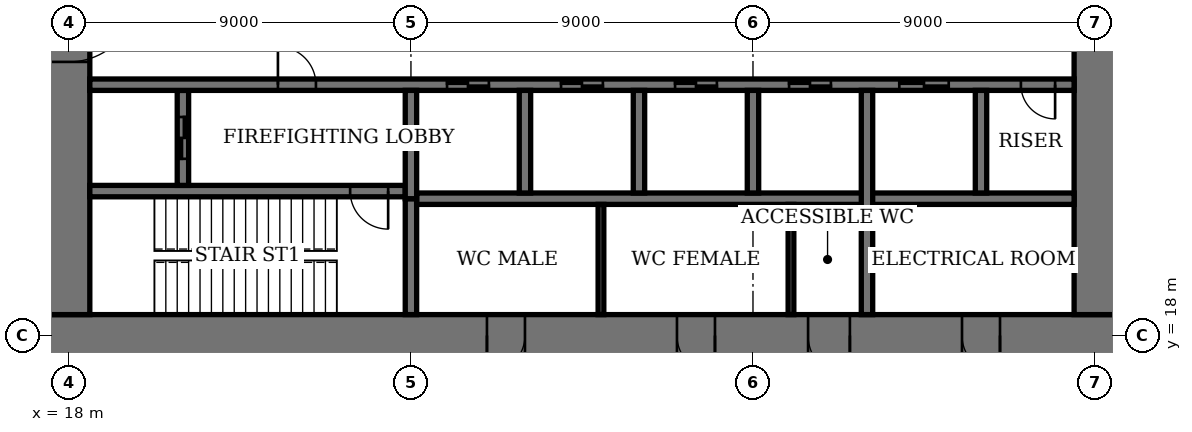
"""IFC4 building model, lengths in metres.
Left out: names, types, materials, properties, quantities, classifications, styles, units other than length and angle.
Written with IfcOpenShell. Run it as: python <this file> out.ifc"""

import sys

from ifc_helpers import new_model, si_unit, direction, frame, frame_2d, origin, place, context, subcontext, project, spatial, rectangle, extrude, element, fill, save


model = new_model("IFC4")
c1 = context("Model", 3, precision=1e-05, world=origin(), true_north=direction((0.0, 1.0)))
c2 = subcontext(c1, "Body", "Model", "MODEL_VIEW")
j1 = project(units=[si_unit("LENGTHUNIT", "METRE"), si_unit("PLANEANGLEUNIT", "RADIAN")], contexts=[c1])
p1 = place(None, origin())
s1 = spatial("IfcSite", under=j1, at=p1, CompositionType="ELEMENT")
p2 = place(p1, origin())
s2 = spatial("IfcBuilding", under=s1, at=p2, CompositionType="ELEMENT")
p3 = place(p2, frame((0.0, 0.0, 157.2)))
s3 = spatial("IfcBuildingStorey", under=s2, at=p3, CompositionType="ELEMENT", Elevation=157.2)
p4 = place(p3, frame((17.45, 18.0, 0.0), z_axis=(0.0, 0.0, 1.0), x_axis=(1.0, 0.0, 0.0)))
e1 = element("IfcWall", 1, at=p4, inside=s3, PredefinedType="SHEAR", context=c2, shape_type="SweptSolid", body=[
    extrude(rectangle(XDim=28.1, YDim=1.1, at=frame_2d((14.05, 0.0))), origin(), (0.0, 0.0, 1.0), 5.0),
])
p5 = place(p4, frame((11.55, 0.0, 0.0)))
e2 = element("IfcOpeningElement", 2, at=p5, cuts=e1, PredefinedType="OPENING", context=c2, shape_type="SweptSolid", body=[
    extrude(rectangle(XDim=1.0, YDim=2.4, at=frame_2d((0.5, 1.2))), frame((0.0, 0.56, 0.0), z_axis=(0.0, -1.0, 0.0), x_axis=(1.0, 0.0, 0.0)), (0.0, 0.0, 1.0), 1.12),
])
p6 = place(p4, frame((16.55, 0.0, 0.0)))
e3 = element("IfcOpeningElement", 3, at=p6, cuts=e1, PredefinedType="OPENING", context=c2, shape_type="SweptSolid", body=[
    extrude(rectangle(XDim=1.0, YDim=2.4, at=frame_2d((0.5, 1.2))), frame((0.0, 0.56, 0.0), z_axis=(0.0, -1.0, 0.0), x_axis=(1.0, 0.0, 0.0)), (0.0, 0.0, 1.0), 1.12),
])
p7 = place(p4, frame((20.0, 0.0, 0.0)))
e4 = element("IfcOpeningElement", 4, at=p7, cuts=e1, PredefinedType="OPENING", context=c2, shape_type="SweptSolid", body=[
    extrude(rectangle(XDim=1.1, YDim=2.4, at=frame_2d((0.55, 1.2))), frame((0.0, 0.56, 0.0), z_axis=(0.0, -1.0, 0.0), x_axis=(1.0, 0.0, 0.0)), (0.0, 0.0, 1.0), 1.12),
])
p8 = place(p4, frame((24.05, 0.0, 0.0)))
e5 = element("IfcOpeningElement", 5, at=p8, cuts=e1, PredefinedType="OPENING", context=c2, shape_type="SweptSolid", body=[
    extrude(rectangle(XDim=1.0, YDim=2.4, at=frame_2d((0.5, 1.2))), frame((0.0, 0.56, 0.0), z_axis=(0.0, -1.0, 0.0), x_axis=(1.0, 0.0, 0.0)), (0.0, 0.0, 1.0), 1.12),
])
p9 = place(p3, frame((18.0, 35.45, 0.0), z_axis=(0.0, 0.0, 1.0), x_axis=(0.0, -1.0, 0.0)))
e6 = element("IfcWall", 6, at=p9, inside=s3, PredefinedType="SHEAR", context=c2, shape_type="SweptSolid", body=[
    extrude(rectangle(XDim=16.9, YDim=1.1, at=frame_2d((8.45, 0.0))), origin(), (0.0, 0.0, 1.0), 5.0),
])
p10 = place(p9, frame((8.45, 0.0, 0.0)))
e7 = element("IfcOpeningElement", 7, at=p10, cuts=e6, PredefinedType="OPENING", context=c2, shape_type="SweptSolid", body=[
    extrude(rectangle(XDim=1.8, YDim=2.4, at=frame_2d((0.9, 1.2))), frame((0.0, 0.56, 0.0), z_axis=(0.0, -1.0, 0.0), x_axis=(1.0, 0.0, 0.0)), (0.0, 0.0, 1.0), 1.12),
])
p11 = place(p3, frame((45.0, 18.55, 0.0), z_axis=(0.0, 0.0, 1.0), x_axis=(0.0, 1.0, 0.0)))
e8 = element("IfcWall", 8, at=p11, inside=s3, PredefinedType="SHEAR", context=c2, shape_type="SweptSolid", body=[
    extrude(rectangle(XDim=16.9, YDim=1.1, at=frame_2d((8.45, 0.0))), origin(), (0.0, 0.0, 1.0), 5.0),
])
p12 = place(p11, frame((8.45, 0.0, 0.0)))
e9 = element("IfcOpeningElement", 9, at=p12, cuts=e8, PredefinedType="OPENING", context=c2, shape_type="SweptSolid", body=[
    extrude(rectangle(XDim=1.8, YDim=2.4, at=frame_2d((0.9, 1.2))), frame((0.0, 0.56, 0.0), z_axis=(0.0, -1.0, 0.0), x_axis=(1.0, 0.0, 0.0)), (0.0, 0.0, 1.0), 1.12),
])
p13 = place(p3, frame((18.55, 21.8, 0.0), z_axis=(0.0, 0.0, 1.0), x_axis=(1.0, 0.0, 0.0)))
e10 = element("IfcWall", 10, at=p13, inside=s3, PredefinedType="SHEAR", context=c2, shape_type="SweptSolid", body=[
    extrude(rectangle(XDim=8.3, YDim=0.3, at=frame_2d((4.15, 0.0))), origin(), (0.0, 0.0, 1.0), 5.0),
])
p14 = place(p13, frame((6.85, 0.0, 0.0)))
e11 = element("IfcOpeningElement", 11, at=p14, cuts=e10, PredefinedType="OPENING", context=c2, shape_type="SweptSolid", body=[
    extrude(rectangle(XDim=1.0, YDim=2.4, at=frame_2d((0.5, 1.2))), frame((0.0, 0.16, 0.0), z_axis=(0.0, -1.0, 0.0), x_axis=(1.0, 0.0, 0.0)), (0.0, 0.0, 1.0), 0.32),
])
p15 = place(p3, frame((27.0, 18.55, 0.0), z_axis=(0.0, 0.0, 1.0), x_axis=(0.0, 1.0, 0.0)))
e12 = element("IfcWall", 12, at=p15, inside=s3, PredefinedType="SHEAR", context=c2, shape_type="SweptSolid", body=[
    extrude(rectangle(XDim=3.05, YDim=0.3, at=frame_2d((1.525, 0.0))), origin(), (0.0, 0.0, 1.0), 5.0),
])
p16 = place(p3, frame((21.0, 21.95, 0.0), z_axis=(0.0, 0.0, 1.0), x_axis=(0.0, 1.0, 0.0)))
e13 = element("IfcWall", 13, at=p16, inside=s3, PredefinedType="SHEAR", context=c2, shape_type="SweptSolid", body=[
    extrude(rectangle(XDim=2.5, YDim=0.3, at=frame_2d((1.25, 0.0))), origin(), (0.0, 0.0, 1.0), 5.0),
])
p17 = place(p16, frame((0.7, 0.0, 0.0)))
e14 = element("IfcOpeningElement", 14, at=p17, cuts=e13, PredefinedType="OPENING", context=c2, shape_type="SweptSolid", body=[
    extrude(rectangle(XDim=1.1, YDim=2.4, at=frame_2d((0.55, 1.2))), frame((0.0, 0.16, 0.0), z_axis=(0.0, -1.0, 0.0), x_axis=(1.0, 0.0, 0.0)), (0.0, 0.0, 1.0), 0.32),
])
p18 = place(p3, frame((18.55, 24.6, 0.0), z_axis=(0.0, 0.0, 1.0), x_axis=(1.0, 0.0, 0.0)))
e15 = element("IfcWall", 15, at=p18, inside=s3, PredefinedType="SHEAR", context=c2, shape_type="SweptSolid", body=[
    extrude(rectangle(XDim=25.9, YDim=0.3, at=frame_2d((12.95, 0.0))), origin(), (0.0, 0.0, 1.0), 5.0),
])
p19 = place(p18, frame((4.95, 0.0, 0.0)))
e16 = element("IfcOpeningElement", 16, at=p19, cuts=e15, PredefinedType="OPENING", context=c2, shape_type="SweptSolid", body=[
    extrude(rectangle(XDim=1.0, YDim=2.4, at=frame_2d((0.5, 1.2))), frame((0.0, 0.16, 0.0), z_axis=(0.0, -1.0, 0.0), x_axis=(1.0, 0.0, 0.0)), (0.0, 0.0, 1.0), 0.32),
])
p20 = place(p18, frame((24.5, 0.0, 0.0)))
e17 = element("IfcOpeningElement", 17, at=p20, cuts=e15, PredefinedType="OPENING", context=c2, shape_type="SweptSolid", body=[
    extrude(rectangle(XDim=0.9, YDim=2.1, at=frame_2d((0.45, 1.05))), frame((0.0, 0.16, 0.0), z_axis=(0.0, -1.0, 0.0), x_axis=(1.0, 0.0, 0.0)), (0.0, 0.0, 1.0), 0.32),
])
p21 = place(p18, frame((9.4, 0.0, 0.0)))
e18 = element("IfcOpeningElement", 18, at=p21, cuts=e15, PredefinedType="OPENING", context=c2, shape_type="SweptSolid", body=[
    extrude(rectangle(XDim=1.1, YDim=2.4, at=frame_2d((0.55, 1.2))), frame((0.0, 0.16, 0.0), z_axis=(0.0, -1.0, 0.0), x_axis=(1.0, 0.0, 0.0)), (0.0, 0.0, 1.0), 0.32),
])
p22 = place(p18, frame((12.4, 0.0, 0.0)))
e19 = element("IfcOpeningElement", 19, at=p22, cuts=e15, PredefinedType="OPENING", context=c2, shape_type="SweptSolid", body=[
    extrude(rectangle(XDim=1.1, YDim=2.4, at=frame_2d((0.55, 1.2))), frame((0.0, 0.16, 0.0), z_axis=(0.0, -1.0, 0.0), x_axis=(1.0, 0.0, 0.0)), (0.0, 0.0, 1.0), 0.32),
])
p23 = place(p18, frame((15.4, 0.0, 0.0)))
e20 = element("IfcOpeningElement", 20, at=p23, cuts=e15, PredefinedType="OPENING", context=c2, shape_type="SweptSolid", body=[
    extrude(rectangle(XDim=1.1, YDim=2.4, at=frame_2d((0.55, 1.2))), frame((0.0, 0.16, 0.0), z_axis=(0.0, -1.0, 0.0), x_axis=(1.0, 0.0, 0.0)), (0.0, 0.0, 1.0), 0.32),
])
p24 = place(p18, frame((18.4, 0.0, 0.0)))
e21 = element("IfcOpeningElement", 21, at=p24, cuts=e15, PredefinedType="OPENING", context=c2, shape_type="SweptSolid", body=[
    extrude(rectangle(XDim=1.1, YDim=2.4, at=frame_2d((0.55, 1.2))), frame((0.0, 0.16, 0.0), z_axis=(0.0, -1.0, 0.0), x_axis=(1.0, 0.0, 0.0)), (0.0, 0.0, 1.0), 0.32),
])
p25 = place(p18, frame((21.3, 0.0, 0.0)))
e22 = element("IfcOpeningElement", 22, at=p25, cuts=e15, PredefinedType="OPENING", context=c2, shape_type="SweptSolid", body=[
    extrude(rectangle(XDim=1.3, YDim=2.4, at=frame_2d((0.65, 1.2))), frame((0.0, 0.16, 0.0), z_axis=(0.0, -1.0, 0.0), x_axis=(1.0, 0.0, 0.0)), (0.0, 0.0, 1.0), 0.32),
])
p26 = place(p3, frame((27.15, 21.6, 0.0), z_axis=(0.0, 0.0, 1.0), x_axis=(1.0, 0.0, 0.0)))
e23 = element("IfcWall", 23, at=p26, inside=s3, PredefinedType="SHEAR", context=c2, shape_type="SweptSolid", body=[
    extrude(rectangle(XDim=17.3, YDim=0.3, at=frame_2d((8.65, 0.0))), origin(), (0.0, 0.0, 1.0), 5.0),
])
for number, where, z_axis, x_axis in (
    (24, (30.0, 21.75, 0.0), (0.0, 0.0, 1.0), (0.0, 1.0, 0.0)),
    (25, (33.0, 21.75, 0.0), (0.0, 0.0, 1.0), (0.0, 1.0, 0.0)),
    (26, (36.0, 21.75, 0.0), (0.0, 0.0, 1.0), (0.0, 1.0, 0.0)),
):
    element("IfcWall", number, at=place(p3, frame(where, z_axis=z_axis, x_axis=x_axis)), inside=s3, PredefinedType="SHEAR", context=c2, shape_type="SweptSolid", body=[
        extrude(rectangle(XDim=2.7, YDim=0.3, at=frame_2d((1.35, 0.0))), origin(), (0.0, 0.0, 1.0), 5.0),
    ])
p27 = place(p3, frame((39.0, 18.55, 0.0), z_axis=(0.0, 0.0, 1.0), x_axis=(0.0, 1.0, 0.0)))
e27 = element("IfcWall", 27, at=p27, inside=s3, PredefinedType="SHEAR", context=c2, shape_type="SweptSolid", body=[
    extrude(rectangle(XDim=5.9, YDim=0.3, at=frame_2d((2.95, 0.0))), origin(), (0.0, 0.0, 1.0), 5.0),
])
p28 = place(p3, frame((42.0, 21.75, 0.0), z_axis=(0.0, 0.0, 1.0), x_axis=(0.0, 1.0, 0.0)))
e28 = element("IfcWall", 28, at=p28, inside=s3, PredefinedType="SHEAR", context=c2, shape_type="SweptSolid", body=[
    extrude(rectangle(XDim=2.7, YDim=0.3, at=frame_2d((1.35, 0.0))), origin(), (0.0, 0.0, 1.0), 5.0),
])
p29 = place(p3, frame((27.0, 21.6, 0.0), z_axis=(0.0, 0.0, 1.0), x_axis=(0.0, 1.0, 0.0)))
e29 = element("IfcWall", 29, at=p29, inside=s3, PredefinedType="SHEAR", context=c2, shape_type="SweptSolid", body=[
    extrude(rectangle(XDim=2.85, YDim=0.3, at=frame_2d((1.425, 0.0))), origin(), (0.0, 0.0, 1.0), 5.0),
])
for number, where, z_axis, x_axis in (
    (30, (32.0, 18.55, 0.0), (0.0, 0.0, 1.0), (0.0, 1.0, 0.0)),
    (31, (37.0, 18.55, 0.0), (0.0, 0.0, 1.0), (0.0, 1.0, 0.0)),
):
    element("IfcWall", number, at=place(p3, frame(where, z_axis=z_axis, x_axis=x_axis)), inside=s3, PredefinedType="PARTITIONING", context=c2, shape_type="SweptSolid", body=[
        extrude(rectangle(XDim=2.9, YDim=0.15, at=frame_2d((1.45, 0.0))), origin(), (0.0, 0.0, 1.0), 4.6),
    ])
p30 = place(p10, origin())
e32 = element("IfcDoor", 32, at=p30, inside=s3, OperationType="DOUBLE_DOOR_DOUBLE_SWING", PredefinedType="DOOR", context=c2, shape_type="SweptSolid", body=[
    extrude(rectangle(XDim=1.8, YDim=2.4, at=frame_2d((0.9, 1.2))), frame((0.0, 0.03, 0.0), z_axis=(0.0, -1.0, 0.0), x_axis=(1.0, 0.0, 0.0)), (0.0, 0.0, 1.0), 0.06),
    extrude(rectangle(XDim=0.04, YDim=2.4, at=frame_2d((0.02, 1.2))), frame((0.0, 0.55, 0.0), z_axis=(0.0, -1.0, 0.0), x_axis=(1.0, 0.0, 0.0)), (0.0, 0.0, 1.0), 1.1),
    extrude(rectangle(XDim=0.04, YDim=2.4, at=frame_2d((1.78, 1.2))), frame((0.0, 0.55, 0.0), z_axis=(0.0, -1.0, 0.0), x_axis=(1.0, 0.0, 0.0)), (0.0, 0.0, 1.0), 1.1),
    extrude(rectangle(XDim=1.8, YDim=0.04, at=frame_2d((0.9, 2.38))), frame((0.0, 0.55, 0.0), z_axis=(0.0, -1.0, 0.0), x_axis=(1.0, 0.0, 0.0)), (0.0, 0.0, 1.0), 1.1),
])
fill(e7, e32)
p31 = place(p5, origin())
e33 = element("IfcDoor", 33, at=p31, inside=s3, OperationType="SINGLE_SWING_LEFT", PredefinedType="DOOR", context=c2, shape_type="SweptSolid", body=[
    extrude(rectangle(XDim=1.0, YDim=2.4, at=frame_2d((0.5, 1.2))), frame((0.0, 0.025, 0.0), z_axis=(0.0, -1.0, 0.0), x_axis=(1.0, 0.0, 0.0)), (0.0, 0.0, 1.0), 0.05),
    extrude(rectangle(XDim=0.04, YDim=2.4, at=frame_2d((0.02, 1.2))), frame((0.0, 0.4, 0.0), z_axis=(0.0, -1.0, 0.0), x_axis=(1.0, 0.0, 0.0)), (0.0, 0.0, 1.0), 0.8),
    extrude(rectangle(XDim=0.04, YDim=2.4, at=frame_2d((0.98, 1.2))), frame((0.0, 0.4, 0.0), z_axis=(0.0, -1.0, 0.0), x_axis=(1.0, 0.0, 0.0)), (0.0, 0.0, 1.0), 0.8),
    extrude(rectangle(XDim=1.0, YDim=0.04, at=frame_2d((0.5, 2.38))), frame((0.0, 0.4, 0.0), z_axis=(0.0, -1.0, 0.0), x_axis=(1.0, 0.0, 0.0)), (0.0, 0.0, 1.0), 0.8),
])
fill(e2, e33)
p32 = place(p6, origin())
e34 = element("IfcDoor", 34, at=p32, inside=s3, OperationType="SINGLE_SWING_RIGHT", PredefinedType="DOOR", context=c2, shape_type="SweptSolid", body=[
    extrude(rectangle(XDim=1.0, YDim=2.4, at=frame_2d((0.5, 1.2))), frame((0.0, 0.025, 0.0), z_axis=(0.0, -1.0, 0.0), x_axis=(1.0, 0.0, 0.0)), (0.0, 0.0, 1.0), 0.05),
    extrude(rectangle(XDim=0.04, YDim=2.4, at=frame_2d((0.02, 1.2))), frame((0.0, 0.4, 0.0), z_axis=(0.0, -1.0, 0.0), x_axis=(1.0, 0.0, 0.0)), (0.0, 0.0, 1.0), 0.8),
    extrude(rectangle(XDim=0.04, YDim=2.4, at=frame_2d((0.98, 1.2))), frame((0.0, 0.4, 0.0), z_axis=(0.0, -1.0, 0.0), x_axis=(1.0, 0.0, 0.0)), (0.0, 0.0, 1.0), 0.8),
    extrude(rectangle(XDim=1.0, YDim=0.04, at=frame_2d((0.5, 2.38))), frame((0.0, 0.4, 0.0), z_axis=(0.0, -1.0, 0.0), x_axis=(1.0, 0.0, 0.0)), (0.0, 0.0, 1.0), 0.8),
])
fill(e3, e34)
p33 = place(p7, origin())
e35 = element("IfcDoor", 35, at=p33, inside=s3, OperationType="SINGLE_SWING_RIGHT", PredefinedType="DOOR", context=c2, shape_type="SweptSolid", body=[
    extrude(rectangle(XDim=1.1, YDim=2.4, at=frame_2d((0.55, 1.2))), frame((0.0, 0.025, 0.0), z_axis=(0.0, -1.0, 0.0), x_axis=(1.0, 0.0, 0.0)), (0.0, 0.0, 1.0), 0.05),
    extrude(rectangle(XDim=0.04, YDim=2.4, at=frame_2d((0.02, 1.2))), frame((0.0, 0.44, 0.0), z_axis=(0.0, -1.0, 0.0), x_axis=(1.0, 0.0, 0.0)), (0.0, 0.0, 1.0), 0.88),
    extrude(rectangle(XDim=0.04, YDim=2.4, at=frame_2d((1.08, 1.2))), frame((0.0, 0.44, 0.0), z_axis=(0.0, -1.0, 0.0), x_axis=(1.0, 0.0, 0.0)), (0.0, 0.0, 1.0), 0.88),
    extrude(rectangle(XDim=1.1, YDim=0.04, at=frame_2d((0.55, 2.38))), frame((0.0, 0.44, 0.0), z_axis=(0.0, -1.0, 0.0), x_axis=(1.0, 0.0, 0.0)), (0.0, 0.0, 1.0), 0.88),
])
fill(e4, e35)
p34 = place(p8, origin())
e36 = element("IfcDoor", 36, at=p34, inside=s3, OperationType="SINGLE_SWING_RIGHT", PredefinedType="DOOR", context=c2, shape_type="SweptSolid", body=[
    extrude(rectangle(XDim=1.0, YDim=2.4, at=frame_2d((0.5, 1.2))), frame((0.0, 0.025, 0.0), z_axis=(0.0, -1.0, 0.0), x_axis=(1.0, 0.0, 0.0)), (0.0, 0.0, 1.0), 0.05),
    extrude(rectangle(XDim=0.04, YDim=2.4, at=frame_2d((0.02, 1.2))), frame((0.0, 0.4, 0.0), z_axis=(0.0, -1.0, 0.0), x_axis=(1.0, 0.0, 0.0)), (0.0, 0.0, 1.0), 0.8),
    extrude(rectangle(XDim=0.04, YDim=2.4, at=frame_2d((0.98, 1.2))), frame((0.0, 0.4, 0.0), z_axis=(0.0, -1.0, 0.0), x_axis=(1.0, 0.0, 0.0)), (0.0, 0.0, 1.0), 0.8),
    extrude(rectangle(XDim=1.0, YDim=0.04, at=frame_2d((0.5, 2.38))), frame((0.0, 0.4, 0.0), z_axis=(0.0, -1.0, 0.0), x_axis=(1.0, 0.0, 0.0)), (0.0, 0.0, 1.0), 0.8),
])
fill(e5, e36)
p35 = place(p14, origin())
e37 = element("IfcDoor", 37, at=p35, inside=s3, OperationType="SINGLE_SWING_RIGHT", PredefinedType="DOOR", context=c2, shape_type="SweptSolid", body=[
    extrude(rectangle(XDim=1.0, YDim=2.4, at=frame_2d((0.5, 1.2))), frame((0.0, 0.03, 0.0), z_axis=(0.0, -1.0, 0.0), x_axis=(1.0, 0.0, 0.0)), (0.0, 0.0, 1.0), 0.06),
])
fill(e11, e37)
p36 = place(p19, origin())
e38 = element("IfcDoor", 38, at=p36, inside=s3, OperationType="SINGLE_SWING_RIGHT", PredefinedType="DOOR", context=c2, shape_type="SweptSolid", body=[
    extrude(rectangle(XDim=1.0, YDim=2.4, at=frame_2d((0.5, 1.2))), frame((0.0, 0.03, 0.0), z_axis=(0.0, -1.0, 0.0), x_axis=(1.0, 0.0, 0.0)), (0.0, 0.0, 1.0), 0.06),
])
fill(e16, e38)
p37 = place(p20, origin())
e39 = element("IfcDoor", 39, at=p37, inside=s3, OperationType="SINGLE_SWING_RIGHT", PredefinedType="DOOR", context=c2, shape_type="SweptSolid", body=[
    extrude(rectangle(XDim=0.9, YDim=2.1, at=frame_2d((0.45, 1.05))), frame((0.0, 0.03, 0.0), z_axis=(0.0, -1.0, 0.0), x_axis=(1.0, 0.0, 0.0)), (0.0, 0.0, 1.0), 0.06),
])
fill(e17, e39)
p38 = place(p21, origin())
e40 = element("IfcDoor", 40, at=p38, inside=s3, OperationType="DOUBLE_DOOR_SLIDING", PredefinedType="DOOR", context=c2, shape_type="SweptSolid", body=[
    extrude(rectangle(XDim=1.1, YDim=2.4, at=frame_2d((0.55, 1.2))), frame((0.0, 0.02, 0.0), z_axis=(0.0, -1.0, 0.0), x_axis=(1.0, 0.0, 0.0)), (0.0, 0.0, 1.0), 0.04),
])
fill(e18, e40)
p39 = place(p22, origin())
e41 = element("IfcDoor", 41, at=p39, inside=s3, OperationType="DOUBLE_DOOR_SLIDING", PredefinedType="DOOR", context=c2, shape_type="SweptSolid", body=[
    extrude(rectangle(XDim=1.1, YDim=2.4, at=frame_2d((0.55, 1.2))), frame((0.0, 0.02, 0.0), z_axis=(0.0, -1.0, 0.0), x_axis=(1.0, 0.0, 0.0)), (0.0, 0.0, 1.0), 0.04),
])
fill(e19, e41)
p40 = place(p23, origin())
e42 = element("IfcDoor", 42, at=p40, inside=s3, OperationType="DOUBLE_DOOR_SLIDING", PredefinedType="DOOR", context=c2, shape_type="SweptSolid", body=[
    extrude(rectangle(XDim=1.1, YDim=2.4, at=frame_2d((0.55, 1.2))), frame((0.0, 0.02, 0.0), z_axis=(0.0, -1.0, 0.0), x_axis=(1.0, 0.0, 0.0)), (0.0, 0.0, 1.0), 0.04),
])
fill(e20, e42)
p41 = place(p24, origin())
e43 = element("IfcDoor", 43, at=p41, inside=s3, OperationType="DOUBLE_DOOR_SLIDING", PredefinedType="DOOR", context=c2, shape_type="SweptSolid", body=[
    extrude(rectangle(XDim=1.1, YDim=2.4, at=frame_2d((0.55, 1.2))), frame((0.0, 0.02, 0.0), z_axis=(0.0, -1.0, 0.0), x_axis=(1.0, 0.0, 0.0)), (0.0, 0.0, 1.0), 0.04),
])
fill(e21, e43)
p42 = place(p25, origin())
e44 = element("IfcDoor", 44, at=p42, inside=s3, OperationType="DOUBLE_DOOR_SLIDING", PredefinedType="DOOR", context=c2, shape_type="SweptSolid", body=[
    extrude(rectangle(XDim=1.3, YDim=2.4, at=frame_2d((0.65, 1.2))), frame((0.0, 0.02, 0.0), z_axis=(0.0, -1.0, 0.0), x_axis=(1.0, 0.0, 0.0)), (0.0, 0.0, 1.0), 0.04),
])
fill(e22, e44)
p43 = place(p17, origin())
e45 = element("IfcDoor", 45, at=p43, inside=s3, OperationType="DOUBLE_DOOR_SLIDING", PredefinedType="DOOR", context=c2, shape_type="SweptSolid", body=[
    extrude(rectangle(XDim=1.1, YDim=2.4, at=frame_2d((0.55, 1.2))), frame((0.0, 0.03, 0.0), z_axis=(0.0, -1.0, 0.0), x_axis=(1.0, 0.0, 0.0)), (0.0, 0.0, 1.0), 0.06),
])
fill(e14, e45)
save(model, sys.argv[1])
